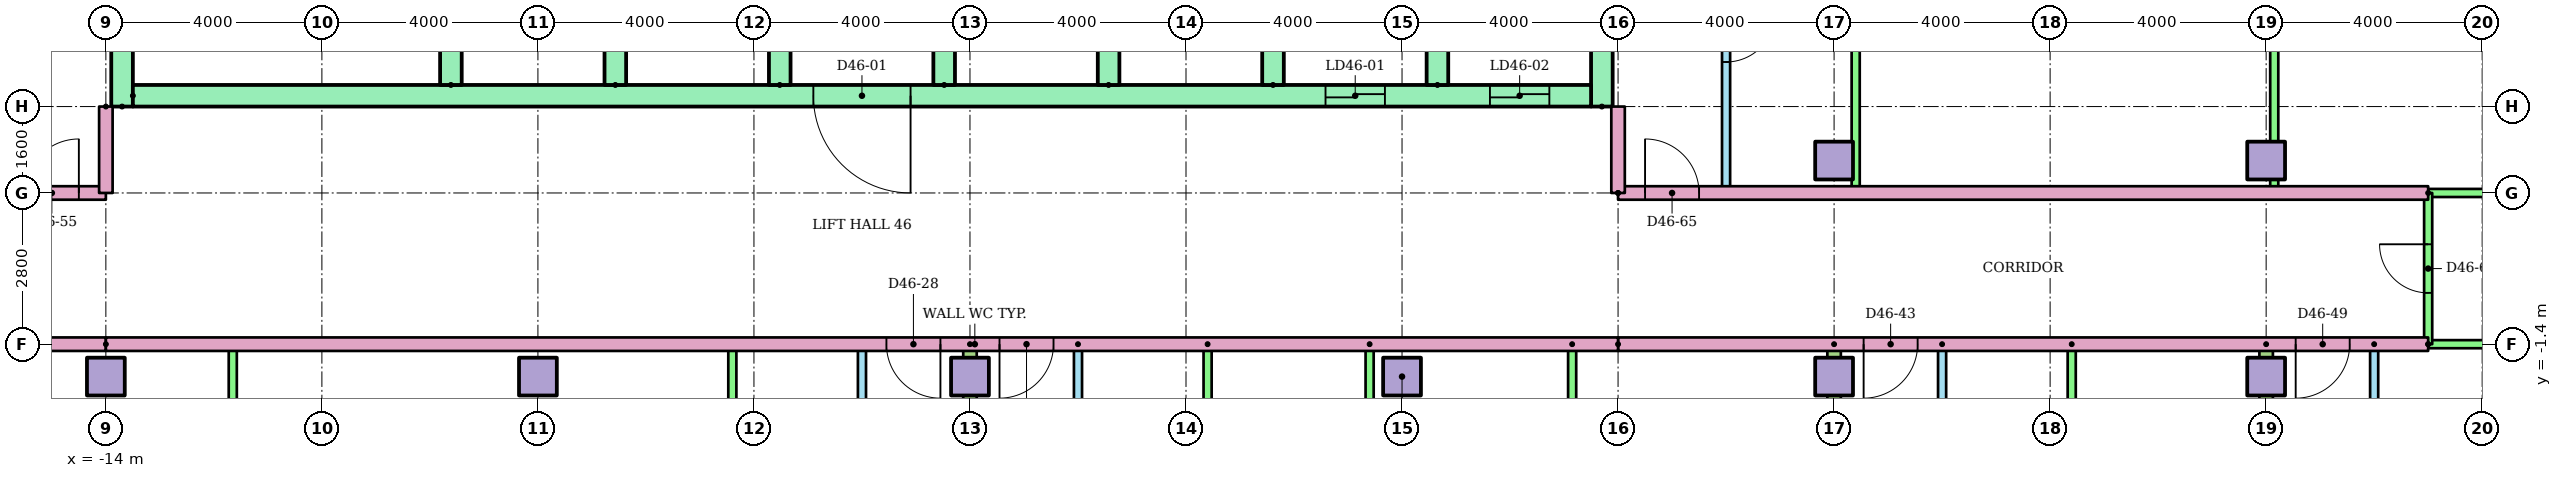
"""IFC4 building model, lengths in metres.
Left out: names, types, materials, properties, quantities, classifications, styles, units other than length and angle.
Written with IfcOpenShell. Run it as: python <this file> out.ifc"""

import sys

from ifc_helpers import new_model, si_unit, direction, frame, frame_2d, origin, origin_2d, place, context, subcontext, project, spatial, rectangle, extrude, element, fill, save


model = new_model("IFC4")
c1 = context("Model", 3, precision=1e-05, world=origin(), true_north=direction((0.0, 1.0)))
c2 = subcontext(c1, "Body", "Model", "MODEL_VIEW")
j1 = project(units=[si_unit("LENGTHUNIT", "METRE"), si_unit("PLANEANGLEUNIT", "RADIAN")], contexts=[c1])
p1 = place(None, origin())
s1 = spatial("IfcSite", under=j1, at=p1, CompositionType="ELEMENT")
p2 = place(p1, origin())
s2 = spatial("IfcBuilding", under=s1, at=p2, CompositionType="ELEMENT")
p3 = place(p2, frame((0.0, 0.0, 178.1)))
s3 = spatial("IfcBuildingStorey", under=s2, at=p3, CompositionType="ELEMENT", Elevation=178.1)
for number, where in (
    (1, (-14.0, -2.0, 0.0)),
    (2, (-6.0, -2.0, 0.0)),
    (3, (2.0, -2.0, 0.0)),
    (4, (10.0, -2.0, 0.0)),
    (5, (18.0, -2.0, 0.0)),
    (6, (26.0, -2.0, 0.0)),
    (7, (18.0, 2.0, 0.0)),
    (8, (26.0, 2.0, 0.0)),
):
    element("IfcColumn", number, at=place(p3, frame(where)), inside=s3, PredefinedType="COLUMN", context=c2, shape_type="SweptSolid", body=[
        extrude(rectangle(XDim=0.7, YDim=0.7, at=origin_2d()), origin(), (0.0, 0.0, 1.0), 3.2),
    ])
for number, where, z_axis, x_axis in (
    (9, (-13.7, 3.0, 0.0), (0.0, 0.0, 1.0), (0.0, 1.0, 0.0)),
    (10, (13.7, 3.0, 0.0), (0.0, 0.0, 1.0), (0.0, 1.0, 0.0)),
):
    element("IfcWall", number, at=place(p3, frame(where, z_axis=z_axis, x_axis=x_axis)), inside=s3, PredefinedType="SHEAR", context=c2, shape_type="SweptSolid", body=[
        extrude(rectangle(XDim=17.0, YDim=0.4, at=frame_2d((8.5, 0.0))), origin(), (0.0, 0.0, 1.0), 2.92),
    ])
p4 = place(p3, frame((-13.5, 3.2, 0.0)))
e11 = element("IfcWall", 11, at=p4, inside=s3, PredefinedType="SHEAR", context=c2, shape_type="SweptSolid", body=[
    extrude(rectangle(XDim=27.0, YDim=0.4, at=frame_2d((13.5, 0.0))), origin(), (0.0, 0.0, 1.0), 2.92),
])
p5 = place(p4, frame((22.083, 0.0, 0.0)))
e12 = element("IfcOpeningElement", 12, at=p5, cuts=e11, PredefinedType="OPENING", context=c2, shape_type="SweptSolid", body=[
    extrude(rectangle(XDim=1.1, YDim=2.1, at=frame_2d((0.55, 1.05))), frame((0.0, 0.21, 0.0), z_axis=(0.0, -1.0, 0.0), x_axis=(1.0, 0.0, 0.0)), (0.0, 0.0, 1.0), 0.42),
])
p6 = place(p4, frame((25.128, 0.0, 0.0)))
e13 = element("IfcOpeningElement", 13, at=p6, cuts=e11, PredefinedType="OPENING", context=c2, shape_type="SweptSolid", body=[
    extrude(rectangle(XDim=1.1, YDim=2.1, at=frame_2d((0.55, 1.05))), frame((0.0, 0.21, 0.0), z_axis=(0.0, -1.0, 0.0), x_axis=(1.0, 0.0, 0.0)), (0.0, 0.0, 1.0), 0.42),
])
p7 = place(p4, frame((12.6, 0.0, 0.0)))
e14 = element("IfcOpeningElement", 14, at=p7, cuts=e11, PredefinedType="OPENING", context=c2, shape_type="SweptSolid", body=[
    extrude(rectangle(XDim=1.8, YDim=2.1, at=frame_2d((0.9, 1.05))), frame((0.0, 0.21, 0.0), z_axis=(0.0, -1.0, 0.0), x_axis=(1.0, 0.0, 0.0)), (0.0, 0.0, 1.0), 0.42),
])
for number, where, z_axis, x_axis in (
    (15, (-7.611, 3.4, 0.0), (0.0, 0.0, 1.0), (0.0, 1.0, 0.0)),
    (16, (-4.567, 3.4, 0.0), (0.0, 0.0, 1.0), (0.0, 1.0, 0.0)),
    (17, (-1.522, 3.4, 0.0), (0.0, 0.0, 1.0), (0.0, 1.0, 0.0)),
    (18, (1.522, 3.4, 0.0), (0.0, 0.0, 1.0), (0.0, 1.0, 0.0)),
    (19, (4.567, 3.4, 0.0), (0.0, 0.0, 1.0), (0.0, 1.0, 0.0)),
    (20, (7.611, 3.4, 0.0), (0.0, 0.0, 1.0), (0.0, 1.0, 0.0)),
    (21, (10.656, 3.4, 0.0), (0.0, 0.0, 1.0), (0.0, 1.0, 0.0)),
):
    element("IfcWall", number, at=place(p3, frame(where, z_axis=z_axis, x_axis=x_axis)), inside=s3, PredefinedType="SHEAR", context=c2, shape_type="SweptSolid", body=[
        extrude(rectangle(XDim=3.0, YDim=0.4, at=frame_2d((1.5, 0.0))), origin(), (0.0, 0.0, 1.0), 2.92),
    ])
p8 = place(p3, frame((0.0, -9.3, 0.0), z_axis=(0.0, 0.0, 1.0), x_axis=(0.0, 1.0, 0.0)))
e22 = element("IfcWall", 22, at=p8, inside=s3, PredefinedType="PARTITIONING", context=c2, shape_type="SweptSolid", body=[
    extrude(rectangle(XDim=7.9, YDim=0.15, at=frame_2d((3.95, 0.0))), origin(), (0.0, 0.0, 1.0), 2.4),
])
p9 = place(p8, frame((5.325, 0.0, 0.0)))
e23 = element("IfcOpeningElement", 23, at=p9, cuts=e22, PredefinedType="OPENING", context=c2, shape_type="SweptSolid", body=[
    extrude(rectangle(XDim=0.9, YDim=2.1, at=frame_2d((0.45, 1.05))), frame((0.0, 0.085, 0.0), z_axis=(0.0, -1.0, 0.0), x_axis=(1.0, 0.0, 0.0)), (0.0, 0.0, 1.0), 0.17),
])
p10 = place(p8, frame((1.425, 0.0, 0.0)))
e24 = element("IfcOpeningElement", 24, at=p10, cuts=e22, PredefinedType="OPENING", context=c2, shape_type="SweptSolid", body=[
    extrude(rectangle(XDim=0.8, YDim=2.1, at=frame_2d((0.4, 1.05))), frame((0.0, 0.085, 0.0), z_axis=(0.0, -1.0, 0.0), x_axis=(1.0, 0.0, 0.0)), (0.0, 0.0, 1.0), 0.17),
])
for number, where, z_axis, x_axis in (
    (25, (-2.4, -9.3, 0.0), (0.0, 0.0, 1.0), (0.0, 1.0, 0.0)),
    (26, (-11.65, -9.3, 0.0), (0.0, 0.0, 1.0), (0.0, 1.0, 0.0)),
):
    element("IfcWall", number, at=place(p3, frame(where, z_axis=z_axis, x_axis=x_axis)), inside=s3, PredefinedType="PARTITIONING", context=c2, shape_type="SweptSolid", body=[
        extrude(rectangle(XDim=7.9, YDim=0.15, at=frame_2d((3.95, 0.0))), origin(), (0.0, 0.0, 1.0), 2.4),
    ])
p11 = place(p3, frame((4.0, -1.4, 0.0), z_axis=(0.0, 0.0, 1.0), x_axis=(0.0, -1.0, 0.0)))
e27 = element("IfcWall", 27, at=p11, inside=s3, PredefinedType="PARTITIONING", context=c2, shape_type="SweptSolid", body=[
    extrude(rectangle(XDim=7.9, YDim=0.15, at=frame_2d((3.95, 0.0))), origin(), (0.0, 0.0, 1.0), 2.4),
])
p12 = place(p11, frame((1.675, 0.0, 0.0)))
e28 = element("IfcOpeningElement", 28, at=p12, cuts=e27, PredefinedType="OPENING", context=c2, shape_type="SweptSolid", body=[
    extrude(rectangle(XDim=0.9, YDim=2.1, at=frame_2d((0.45, 1.05))), frame((0.0, 0.085, 0.0), z_axis=(0.0, -1.0, 0.0), x_axis=(1.0, 0.0, 0.0)), (0.0, 0.0, 1.0), 0.17),
])
p13 = place(p11, frame((5.675, 0.0, 0.0)))
e29 = element("IfcOpeningElement", 29, at=p13, cuts=e27, PredefinedType="OPENING", context=c2, shape_type="SweptSolid", body=[
    extrude(rectangle(XDim=0.8, YDim=2.1, at=frame_2d((0.4, 1.05))), frame((0.0, 0.085, 0.0), z_axis=(0.0, -1.0, 0.0), x_axis=(1.0, 0.0, 0.0)), (0.0, 0.0, 1.0), 0.17),
])
for number, where, z_axis, x_axis in (
    (30, (6.4, -1.4, 0.0), (0.0, 0.0, 1.0), (0.0, -1.0, 0.0)),
    (31, (9.4, -1.4, 0.0), (0.0, 0.0, 1.0), (0.0, -1.0, 0.0)),
    (32, (13.15, -1.4, 0.0), (0.0, 0.0, 1.0), (0.0, -1.0, 0.0)),
):
    element("IfcWall", number, at=place(p3, frame(where, z_axis=z_axis, x_axis=x_axis)), inside=s3, PredefinedType="PARTITIONING", context=c2, shape_type="SweptSolid", body=[
        extrude(rectangle(XDim=7.9, YDim=0.15, at=frame_2d((3.95, 0.0))), origin(), (0.0, 0.0, 1.0), 2.4),
    ])
p14 = place(p3, frame((2.0, -1.4, 0.0), z_axis=(0.0, 0.0, 1.0), x_axis=(0.0, -1.0, 0.0)))
e33 = element("IfcWall", 33, at=p14, inside=s3, PredefinedType="PARTITIONING", context=c2, shape_type="SweptSolid", body=[
    extrude(rectangle(XDim=15.01, YDim=0.25, at=frame_2d((7.505, 0.0))), origin(), (0.0, 0.0, 1.0), 2.4),
])
p15 = place(p3, frame((20.0, -1.4, 0.0), z_axis=(0.0, 0.0, 1.0), x_axis=(0.0, -1.0, 0.0)))
e34 = element("IfcWall", 34, at=p15, inside=s3, PredefinedType="PARTITIONING", context=c2, shape_type="SweptSolid", body=[
    extrude(rectangle(XDim=7.9, YDim=0.15, at=frame_2d((3.95, 0.0))), origin(), (0.0, 0.0, 1.0), 2.4),
])
p16 = place(p15, frame((1.675, 0.0, 0.0)))
e35 = element("IfcOpeningElement", 35, at=p16, cuts=e34, PredefinedType="OPENING", context=c2, shape_type="SweptSolid", body=[
    extrude(rectangle(XDim=0.9, YDim=2.1, at=frame_2d((0.45, 1.05))), frame((0.0, 0.085, 0.0), z_axis=(0.0, -1.0, 0.0), x_axis=(1.0, 0.0, 0.0)), (0.0, 0.0, 1.0), 0.17),
])
p17 = place(p15, frame((5.675, 0.0, 0.0)))
e36 = element("IfcOpeningElement", 36, at=p17, cuts=e34, PredefinedType="OPENING", context=c2, shape_type="SweptSolid", body=[
    extrude(rectangle(XDim=0.8, YDim=2.1, at=frame_2d((0.4, 1.05))), frame((0.0, 0.085, 0.0), z_axis=(0.0, -1.0, 0.0), x_axis=(1.0, 0.0, 0.0)), (0.0, 0.0, 1.0), 0.17),
])
p18 = place(p3, frame((22.4, -1.4, 0.0), z_axis=(0.0, 0.0, 1.0), x_axis=(0.0, -1.0, 0.0)))
e37 = element("IfcWall", 37, at=p18, inside=s3, PredefinedType="PARTITIONING", context=c2, shape_type="SweptSolid", body=[
    extrude(rectangle(XDim=7.9, YDim=0.15, at=frame_2d((3.95, 0.0))), origin(), (0.0, 0.0, 1.0), 2.4),
])
p19 = place(p3, frame((18.0, -1.4, 0.0), z_axis=(0.0, 0.0, 1.0), x_axis=(0.0, -1.0, 0.0)))
e38 = element("IfcWall", 38, at=p19, inside=s3, PredefinedType="PARTITIONING", context=c2, shape_type="SweptSolid", body=[
    extrude(rectangle(XDim=15.01, YDim=0.25, at=frame_2d((7.505, 0.0))), origin(), (0.0, 0.0, 1.0), 2.4),
])
p20 = place(p3, frame((28.0, -1.4, 0.0), z_axis=(0.0, 0.0, 1.0), x_axis=(0.0, -1.0, 0.0)))
e39 = element("IfcWall", 39, at=p20, inside=s3, PredefinedType="PARTITIONING", context=c2, shape_type="SweptSolid", body=[
    extrude(rectangle(XDim=7.9, YDim=0.15, at=frame_2d((3.95, 0.0))), origin(), (0.0, 0.0, 1.0), 2.4),
])
p21 = place(p20, frame((1.675, 0.0, 0.0)))
e40 = element("IfcOpeningElement", 40, at=p21, cuts=e39, PredefinedType="OPENING", context=c2, shape_type="SweptSolid", body=[
    extrude(rectangle(XDim=0.9, YDim=2.1, at=frame_2d((0.45, 1.05))), frame((0.0, 0.085, 0.0), z_axis=(0.0, -1.0, 0.0), x_axis=(1.0, 0.0, 0.0)), (0.0, 0.0, 1.0), 0.17),
])
p22 = place(p20, frame((5.675, 0.0, 0.0)))
e41 = element("IfcOpeningElement", 41, at=p22, cuts=e39, PredefinedType="OPENING", context=c2, shape_type="SweptSolid", body=[
    extrude(rectangle(XDim=0.8, YDim=2.1, at=frame_2d((0.4, 1.05))), frame((0.0, 0.085, 0.0), z_axis=(0.0, -1.0, 0.0), x_axis=(1.0, 0.0, 0.0)), (0.0, 0.0, 1.0), 0.17),
])
p23 = place(p3, frame((26.0, -1.4, 0.0), z_axis=(0.0, 0.0, 1.0), x_axis=(0.0, -1.0, 0.0)))
e42 = element("IfcWall", 42, at=p23, inside=s3, PredefinedType="PARTITIONING", context=c2, shape_type="SweptSolid", body=[
    extrude(rectangle(XDim=15.01, YDim=0.25, at=frame_2d((7.505, 0.0))), origin(), (0.0, 0.0, 1.0), 2.4),
])
p24 = place(p3, frame((-14.0, -1.4, 0.0), z_axis=(0.0, 0.0, 1.0), x_axis=(-1.0, 0.0, 0.0)))
e43 = element("IfcWall", 43, at=p24, inside=s3, PredefinedType="PARTITIONING", context=c2, shape_type="SweptSolid", body=[
    extrude(rectangle(XDim=10.82, YDim=0.25, at=frame_2d((5.41, 0.0))), origin(), (0.0, 0.0, 1.0), 2.4),
])
p25 = place(p3, frame((29.0, -1.4, 0.0), z_axis=(0.0, 0.0, 1.0), x_axis=(-1.0, 0.0, 0.0)))
e44 = element("IfcWall", 44, at=p25, inside=s3, PredefinedType="PARTITIONING", context=c2, shape_type="SweptSolid", body=[
    extrude(rectangle(XDim=15.0, YDim=0.25, at=frame_2d((7.5, 0.0))), origin(), (0.0, 0.0, 1.0), 2.4),
])
p26 = place(p25, frame((9.453, 0.0, 0.0)))
e45 = element("IfcOpeningElement", 45, at=p26, cuts=e44, PredefinedType="OPENING", context=c2, shape_type="SweptSolid", body=[
    extrude(rectangle(XDim=1.0, YDim=2.1, at=frame_2d((0.5, 1.05))), frame((0.0, 0.135, 0.0), z_axis=(0.0, -1.0, 0.0), x_axis=(1.0, 0.0, 0.0)), (0.0, 0.0, 1.0), 0.27),
])
p27 = place(p25, frame((1.453, 0.0, 0.0)))
e46 = element("IfcOpeningElement", 46, at=p27, cuts=e44, PredefinedType="OPENING", context=c2, shape_type="SweptSolid", body=[
    extrude(rectangle(XDim=1.0, YDim=2.1, at=frame_2d((0.5, 1.05))), frame((0.0, 0.135, 0.0), z_axis=(0.0, -1.0, 0.0), x_axis=(1.0, 0.0, 0.0)), (0.0, 0.0, 1.0), 0.27),
])
p28 = place(p3, frame((36.82, -1.4, 0.0), z_axis=(0.0, 0.0, 1.0), x_axis=(-1.0, 0.0, 0.0)))
e47 = element("IfcWall", 47, at=p28, inside=s3, PredefinedType="PARTITIONING", context=c2, shape_type="SweptSolid", body=[
    extrude(rectangle(XDim=7.82, YDim=0.15, at=frame_2d((3.91, 0.0))), origin(), (0.0, 0.0, 1.0), 2.4),
])
p29 = place(p3, frame((-24.82, 1.4, 0.0)))
e48 = element("IfcWall", 48, at=p29, inside=s3, PredefinedType="PARTITIONING", context=c2, shape_type="SweptSolid", body=[
    extrude(rectangle(XDim=10.82, YDim=0.25, at=frame_2d((5.41, 0.0))), origin(), (0.0, 0.0, 1.0), 2.4),
])
p30 = place(p29, frame((9.32, 0.0, 0.0)))
e49 = element("IfcOpeningElement", 49, at=p30, cuts=e48, PredefinedType="OPENING", context=c2, shape_type="SweptSolid", body=[
    extrude(rectangle(XDim=1.0, YDim=2.1, at=frame_2d((0.5, 1.05))), frame((0.0, 0.135, 0.0), z_axis=(0.0, -1.0, 0.0), x_axis=(1.0, 0.0, 0.0)), (0.0, 0.0, 1.0), 0.27),
])
p31 = place(p3, frame((16.0, 11.7, 0.0), z_axis=(0.0, 0.0, 1.0), x_axis=(0.0, -1.0, 0.0)))
e50 = element("IfcWall", 50, at=p31, inside=s3, PredefinedType="PARTITIONING", context=c2, shape_type="SweptSolid", body=[
    extrude(rectangle(XDim=10.3, YDim=0.15, at=frame_2d((5.15, 0.0))), origin(), (0.0, 0.0, 1.0), 2.4),
])
p32 = place(p31, frame((6.975, 0.0, 0.0)))
e51 = element("IfcOpeningElement", 51, at=p32, cuts=e50, PredefinedType="OPENING", context=c2, shape_type="SweptSolid", body=[
    extrude(rectangle(XDim=0.9, YDim=2.1, at=frame_2d((0.45, 1.05))), frame((0.0, 0.085, 0.0), z_axis=(0.0, -1.0, 0.0), x_axis=(1.0, 0.0, 0.0)), (0.0, 0.0, 1.0), 0.17),
])
p33 = place(p31, frame((1.875, 0.0, 0.0)))
e52 = element("IfcOpeningElement", 52, at=p33, cuts=e50, PredefinedType="OPENING", context=c2, shape_type="SweptSolid", body=[
    extrude(rectangle(XDim=0.8, YDim=2.1, at=frame_2d((0.4, 1.05))), frame((0.0, 0.085, 0.0), z_axis=(0.0, -1.0, 0.0), x_axis=(1.0, 0.0, 0.0)), (0.0, 0.0, 1.0), 0.17),
])
for number, where, z_axis, x_axis in (
    (53, (18.4, 11.7, 0.0), (0.0, 0.0, 1.0), (0.0, -1.0, 0.0)),
    (54, (26.15, 11.7, 0.0), (0.0, 0.0, 1.0), (0.0, -1.0, 0.0)),
):
    element("IfcWall", number, at=place(p3, frame(where, z_axis=z_axis, x_axis=x_axis)), inside=s3, PredefinedType="PARTITIONING", context=c2, shape_type="SweptSolid", body=[
        extrude(rectangle(XDim=10.3, YDim=0.15, at=frame_2d((5.15, 0.0))), origin(), (0.0, 0.0, 1.0), 2.4),
    ])
p34 = place(p3, frame((14.0, 1.4, 0.0)))
e55 = element("IfcWall", 55, at=p34, inside=s3, PredefinedType="PARTITIONING", context=c2, shape_type="SweptSolid", body=[
    extrude(rectangle(XDim=15.0, YDim=0.25, at=frame_2d((7.5, 0.0))), origin(), (0.0, 0.0, 1.0), 2.4),
])
p35 = place(p34, frame((0.5, 0.0, 0.0)))
e56 = element("IfcOpeningElement", 56, at=p35, cuts=e55, PredefinedType="OPENING", context=c2, shape_type="SweptSolid", body=[
    extrude(rectangle(XDim=1.0, YDim=2.1, at=frame_2d((0.5, 1.05))), frame((0.0, 0.135, 0.0), z_axis=(0.0, -1.0, 0.0), x_axis=(1.0, 0.0, 0.0)), (0.0, 0.0, 1.0), 0.27),
])
p36 = place(p3, frame((29.0, 1.4, 0.0)))
e57 = element("IfcWall", 57, at=p36, inside=s3, PredefinedType="PARTITIONING", context=c2, shape_type="SweptSolid", body=[
    extrude(rectangle(XDim=7.82, YDim=0.15, at=frame_2d((3.91, 0.0))), origin(), (0.0, 0.0, 1.0), 2.4),
])
p37 = place(p3, frame((29.0, -1.4, 0.0), z_axis=(0.0, 0.0, 1.0), x_axis=(0.0, 1.0, 0.0)))
e58 = element("IfcWall", 58, at=p37, inside=s3, PredefinedType="PARTITIONING", context=c2, shape_type="SweptSolid", body=[
    extrude(rectangle(XDim=2.8, YDim=0.15, at=frame_2d((1.4, 0.0))), origin(), (0.0, 0.0, 1.0), 2.4),
])
p38 = place(p37, frame((0.95, 0.0, 0.0)))
e59 = element("IfcOpeningElement", 59, at=p38, cuts=e58, PredefinedType="OPENING", context=c2, shape_type="SweptSolid", body=[
    extrude(rectangle(XDim=0.9, YDim=2.1, at=frame_2d((0.45, 1.05))), frame((0.0, 0.085, 0.0), z_axis=(0.0, -1.0, 0.0), x_axis=(1.0, 0.0, 0.0)), (0.0, 0.0, 1.0), 0.17),
])
p39 = place(p3, frame((14.0, -1.4, 0.0), z_axis=(0.0, 0.0, 1.0), x_axis=(-1.0, 0.0, 0.0)))
e60 = element("IfcWall", 60, at=p39, inside=s3, PredefinedType="PARTITIONING", context=c2, shape_type="SweptSolid", body=[
    extrude(rectangle(XDim=28.0, YDim=0.25, at=frame_2d((14.0, 0.0))), origin(), (0.0, 0.0, 1.0), 2.4),
])
p40 = place(p39, frame((12.547, 0.0, 0.0)))
e61 = element("IfcOpeningElement", 61, at=p40, cuts=e60, PredefinedType="OPENING", context=c2, shape_type="SweptSolid", body=[
    extrude(rectangle(XDim=1.0, YDim=2.1, at=frame_2d((0.5, 1.05))), frame((0.0, 0.135, 0.0), z_axis=(0.0, -1.0, 0.0), x_axis=(1.0, 0.0, 0.0)), (0.0, 0.0, 1.0), 0.27),
])
p41 = place(p39, frame((10.453, 0.0, 0.0)))
e62 = element("IfcOpeningElement", 62, at=p41, cuts=e60, PredefinedType="OPENING", context=c2, shape_type="SweptSolid", body=[
    extrude(rectangle(XDim=1.0, YDim=2.1, at=frame_2d((0.5, 1.05))), frame((0.0, 0.135, 0.0), z_axis=(0.0, -1.0, 0.0), x_axis=(1.0, 0.0, 0.0)), (0.0, 0.0, 1.0), 0.27),
])
for number, where, z_axis, x_axis in (
    (63, (-14.0, 3.0, 0.0), (0.0, 0.0, 1.0), (0.0, -1.0, 0.0)),
    (64, (14.0, 1.4, 0.0), (0.0, 0.0, 1.0), (0.0, 1.0, 0.0)),
):
    element("IfcWall", number, at=place(p3, frame(where, z_axis=z_axis, x_axis=x_axis)), inside=s3, PredefinedType="PARTITIONING", context=c2, shape_type="SweptSolid", body=[
        extrude(rectangle(XDim=1.6, YDim=0.25, at=frame_2d((0.8, 0.0))), origin(), (0.0, 0.0, 1.0), 2.4),
    ])
p42 = place(p5, origin())
e65 = element("IfcDoor", 65, at=p42, inside=s3, OperationType="SLIDING_TO_LEFT", PredefinedType="DOOR", context=c2, shape_type="SweptSolid", body=[
    extrude(rectangle(XDim=1.1, YDim=2.1, at=frame_2d((0.55, 1.05))), frame((0.0, 0.025, 0.0), z_axis=(0.0, -1.0, 0.0), x_axis=(1.0, 0.0, 0.0)), (0.0, 0.0, 1.0), 0.05),
])
fill(e12, e65)
p43 = place(p6, origin())
e66 = element("IfcDoor", 66, at=p43, inside=s3, OperationType="SLIDING_TO_LEFT", PredefinedType="DOOR", context=c2, shape_type="SweptSolid", body=[
    extrude(rectangle(XDim=1.1, YDim=2.1, at=frame_2d((0.55, 1.05))), frame((0.0, 0.025, 0.0), z_axis=(0.0, -1.0, 0.0), x_axis=(1.0, 0.0, 0.0)), (0.0, 0.0, 1.0), 0.05),
])
fill(e13, e66)
p44 = place(p7, frame((1.8, 0.0, 0.0), z_axis=(0.0, 0.0, 1.0), x_axis=(-1.0, 0.0, 0.0)))
e67 = element("IfcDoor", 67, at=p44, inside=s3, OperationType="DOUBLE_DOOR_SINGLE_SWING", PredefinedType="DOOR", context=c2, shape_type="SweptSolid", body=[
    extrude(rectangle(XDim=1.8, YDim=2.1, at=frame_2d((0.9, 1.05))), frame((0.0, 0.025, 0.0), z_axis=(0.0, -1.0, 0.0), x_axis=(1.0, 0.0, 0.0)), (0.0, 0.0, 1.0), 0.05),
])
fill(e14, e67)
p45 = place(p40, origin())
e68 = element("IfcDoor", 68, at=p45, inside=s3, OperationType="SINGLE_SWING_LEFT", PredefinedType="DOOR", context=c2, shape_type="SweptSolid", body=[
    extrude(rectangle(XDim=1.0, YDim=2.1, at=frame_2d((0.5, 1.05))), frame((0.0, 0.025, 0.0), z_axis=(0.0, -1.0, 0.0), x_axis=(1.0, 0.0, 0.0)), (0.0, 0.0, 1.0), 0.05),
])
fill(e61, e68)
p46 = place(p41, origin())
e69 = element("IfcDoor", 69, at=p46, inside=s3, OperationType="SINGLE_SWING_RIGHT", PredefinedType="DOOR", context=c2, shape_type="SweptSolid", body=[
    extrude(rectangle(XDim=1.0, YDim=2.1, at=frame_2d((0.5, 1.05))), frame((0.0, 0.025, 0.0), z_axis=(0.0, -1.0, 0.0), x_axis=(1.0, 0.0, 0.0)), (0.0, 0.0, 1.0), 0.05),
])
fill(e62, e69)
p47 = place(p26, origin())
e70 = element("IfcDoor", 70, at=p47, inside=s3, OperationType="SINGLE_SWING_RIGHT", PredefinedType="DOOR", context=c2, shape_type="SweptSolid", body=[
    extrude(rectangle(XDim=1.0, YDim=2.1, at=frame_2d((0.5, 1.05))), frame((0.0, 0.025, 0.0), z_axis=(0.0, -1.0, 0.0), x_axis=(1.0, 0.0, 0.0)), (0.0, 0.0, 1.0), 0.05),
])
fill(e45, e70)
p48 = place(p27, origin())
e71 = element("IfcDoor", 71, at=p48, inside=s3, OperationType="SINGLE_SWING_RIGHT", PredefinedType="DOOR", context=c2, shape_type="SweptSolid", body=[
    extrude(rectangle(XDim=1.0, YDim=2.1, at=frame_2d((0.5, 1.05))), frame((0.0, 0.025, 0.0), z_axis=(0.0, -1.0, 0.0), x_axis=(1.0, 0.0, 0.0)), (0.0, 0.0, 1.0), 0.05),
])
fill(e46, e71)
p49 = place(p30, origin())
e72 = element("IfcDoor", 72, at=p49, inside=s3, OperationType="SINGLE_SWING_RIGHT", PredefinedType="DOOR", context=c2, shape_type="SweptSolid", body=[
    extrude(rectangle(XDim=1.0, YDim=2.1, at=frame_2d((0.5, 1.05))), frame((0.0, 0.025, 0.0), z_axis=(0.0, -1.0, 0.0), x_axis=(1.0, 0.0, 0.0)), (0.0, 0.0, 1.0), 0.05),
])
fill(e49, e72)
p50 = place(p32, origin())
e73 = element("IfcDoor", 73, at=p50, inside=s3, OperationType="SINGLE_SWING_LEFT", PredefinedType="DOOR", context=c2, shape_type="SweptSolid", body=[
    extrude(rectangle(XDim=0.9, YDim=2.1, at=frame_2d((0.45, 1.05))), frame((0.0, 0.025, 0.0), z_axis=(0.0, -1.0, 0.0), x_axis=(1.0, 0.0, 0.0)), (0.0, 0.0, 1.0), 0.05),
])
fill(e51, e73)
p51 = place(p35, origin())
e74 = element("IfcDoor", 74, at=p51, inside=s3, OperationType="SINGLE_SWING_LEFT", PredefinedType="DOOR", context=c2, shape_type="SweptSolid", body=[
    extrude(rectangle(XDim=1.0, YDim=2.1, at=frame_2d((0.5, 1.05))), frame((0.0, 0.025, 0.0), z_axis=(0.0, -1.0, 0.0), x_axis=(1.0, 0.0, 0.0)), (0.0, 0.0, 1.0), 0.05),
])
fill(e56, e74)
p52 = place(p38, origin())
e75 = element("IfcDoor", 75, at=p52, inside=s3, OperationType="SINGLE_SWING_RIGHT", PredefinedType="DOOR", context=c2, shape_type="SweptSolid", body=[
    extrude(rectangle(XDim=0.9, YDim=2.1, at=frame_2d((0.45, 1.05))), frame((0.0, 0.025, 0.0), z_axis=(0.0, -1.0, 0.0), x_axis=(1.0, 0.0, 0.0)), (0.0, 0.0, 1.0), 0.05),
])
fill(e59, e75)
save(model, sys.argv[1])
